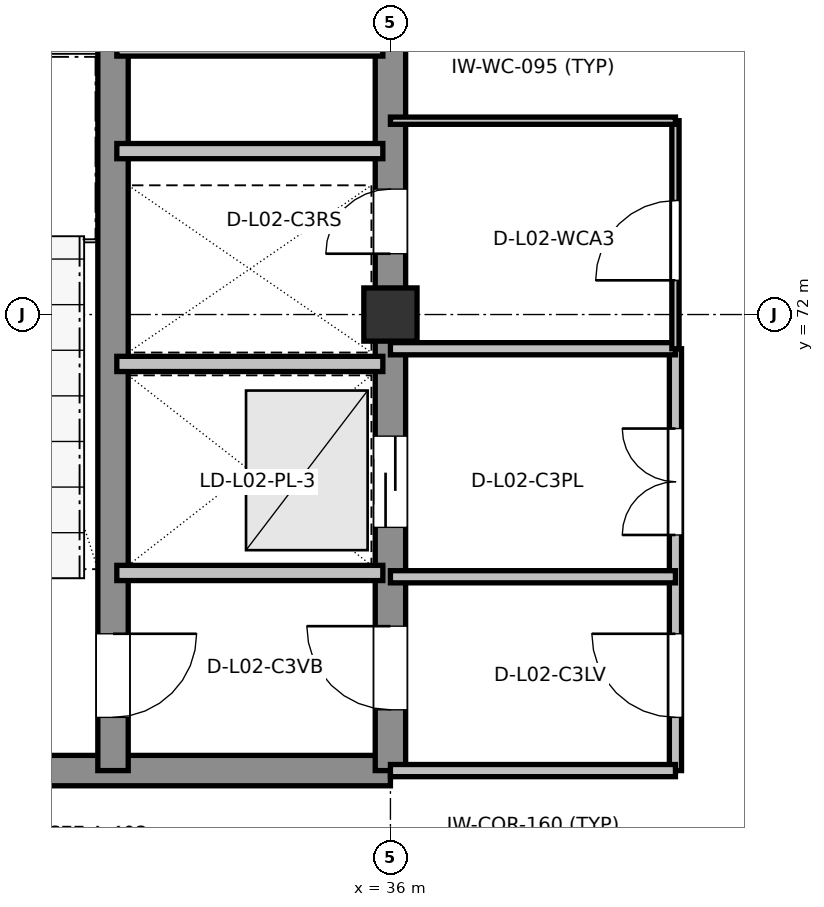
"""IFC4 building model, lengths in metres.
Left out: names, types, materials, properties, quantities, classifications, styles, units other than length and angle.
Written with IfcOpenShell. Run it as: python <this file> out.ifc"""

import sys

from ifc_helpers import new_model, si_unit, direction, frame, frame_2d, origin, origin_2d, place, context, subcontext, project, spatial, rectangle, extrude, element, fill, save


model = new_model("IFC4")
c1 = context("Model", 3, precision=1e-05, world=origin(), true_north=direction((0.0, 1.0)))
c2 = subcontext(c1, "Body", "Model", "MODEL_VIEW")
j1 = project(units=[si_unit("LENGTHUNIT", "METRE"), si_unit("PLANEANGLEUNIT", "RADIAN")], contexts=[c1])
p1 = place(None, origin())
s1 = spatial("IfcSite", under=j1, at=p1, CompositionType="ELEMENT")
p2 = place(p1, origin())
s2 = spatial("IfcBuilding", under=s1, at=p2, CompositionType="ELEMENT")
p3 = place(p2, frame((0.0, 0.0, 10.2)))
s3 = spatial("IfcBuildingStorey", under=s2, at=p3, CompositionType="ELEMENT", Elevation=10.2)
p4 = place(p3, frame((36.0, 72.0, 0.0), z_axis=(0.0, 0.0, 1.0), x_axis=(1.0, 0.0, 0.0)))
e1 = element("IfcColumn", 1, at=p4, inside=s3, PredefinedType="COLUMN", context=c2, shape_type="SweptSolid", body=[
    extrude(rectangle(XDim=0.7, YDim=0.7, at=origin_2d()), origin(), (0.0, 0.0, 1.0), 4.8),
])
p5 = place(p3, frame((27.0, 66.0, 0.0), z_axis=(0.0, 0.0, 1.0), x_axis=(1.0, 0.0, 0.0)))
e2 = element("IfcWall", 2, at=p5, inside=s3, PredefinedType="SHEAR", context=c2, shape_type="SweptSolid", body=[
    extrude(rectangle(XDim=9.0, YDim=0.4, at=frame_2d((4.5, 0.0))), origin(), (0.0, 0.0, 1.0), 4.56),
])
p6 = place(p3, frame((36.0, 66.0, 0.0), z_axis=(0.0, 0.0, 1.0), x_axis=(0.0, 1.0, 0.0)))
e3 = element("IfcWall", 3, at=p6, inside=s3, PredefinedType="SHEAR", context=c2, shape_type="SweptSolid", body=[
    extrude(rectangle(XDim=18.0, YDim=0.4, at=frame_2d((9.0, 0.0))), origin(), (0.0, 0.0, 1.0), 4.56),
])
p7 = place(p6, frame((0.8, 0.0, 0.0)))
e4 = element("IfcOpeningElement", 4, at=p7, cuts=e3, PredefinedType="OPENING", context=c2, shape_type="SweptSolid", body=[
    extrude(rectangle(XDim=1.1, YDim=2.16, at=frame_2d((0.55, 1.08))), frame((0.0, 0.21, 0.0), z_axis=(0.0, -1.0, 0.0), x_axis=(1.0, 0.0, 0.0)), (0.0, 0.0, 1.0), 0.42),
])
p8 = place(p6, frame((3.2, 0.0, 0.0)))
e5 = element("IfcOpeningElement", 5, at=p8, cuts=e3, PredefinedType="OPENING", context=c2, shape_type="SweptSolid", body=[
    extrude(rectangle(XDim=1.2, YDim=2.2, at=frame_2d((0.6, 1.1))), frame((0.0, 0.21, 0.0), z_axis=(0.0, -1.0, 0.0), x_axis=(1.0, 0.0, 0.0)), (0.0, 0.0, 1.0), 0.42),
])
p9 = place(p6, frame((6.8, 0.0, 0.0)))
e6 = element("IfcOpeningElement", 6, at=p9, cuts=e3, PredefinedType="OPENING", context=c2, shape_type="SweptSolid", body=[
    extrude(rectangle(XDim=0.85, YDim=2.1, at=frame_2d((0.425, 1.05))), frame((0.0, 0.21, 0.0), z_axis=(0.0, -1.0, 0.0), x_axis=(1.0, 0.0, 0.0)), (0.0, 0.0, 1.0), 0.42),
])
p10 = place(p3, frame((32.35, 66.0, 0.0), z_axis=(0.0, 0.0, 1.0), x_axis=(0.0, 1.0, 0.0)))
e7 = element("IfcWall", 7, at=p10, inside=s3, PredefinedType="SHEAR", context=c2, shape_type="SweptSolid", body=[
    extrude(rectangle(XDim=18.0, YDim=0.4, at=frame_2d((9.0, 0.0))), origin(), (0.0, 0.0, 1.0), 4.56),
])
p11 = place(p10, frame((0.7, 0.0, 0.0)))
e8 = element("IfcOpeningElement", 8, at=p11, cuts=e7, PredefinedType="OPENING", context=c2, shape_type="SweptSolid", body=[
    extrude(rectangle(XDim=1.1, YDim=2.16, at=frame_2d((0.55, 1.08))), frame((0.0, 0.21, 0.0), z_axis=(0.0, -1.0, 0.0), x_axis=(1.0, 0.0, 0.0)), (0.0, 0.0, 1.0), 0.42),
])
for number, where, z_axis, x_axis in (
    (9, (32.4, 68.6, 0.0), (0.0, 0.0, 1.0), (1.0, 0.0, 0.0)),
    (10, (32.4, 71.35, 0.0), (0.0, 0.0, 1.0), (1.0, 0.0, 0.0)),
    (11, (32.4, 74.15, 0.0), (0.0, 0.0, 1.0), (1.0, 0.0, 0.0)),
    (12, (32.4, 75.5, 0.0), (0.0, 0.0, 1.0), (1.0, 0.0, 0.0)),
):
    element("IfcWall", number, at=place(p3, frame(where, z_axis=z_axis, x_axis=x_axis)), inside=s3, PredefinedType="PARTITIONING", context=c2, shape_type="SweptSolid", body=[
        extrude(rectangle(XDim=3.5, YDim=0.2, at=frame_2d((1.75, 0.0))), origin(), (0.0, 0.0, 1.0), 4.56),
    ])
p12 = place(p3, frame((39.75, 66.0, 0.0), z_axis=(0.0, 0.0, 1.0), x_axis=(0.0, 1.0, 0.0)))
e13 = element("IfcWall", 13, at=p12, inside=s3, PredefinedType="PARTITIONING", context=c2, shape_type="SweptSolid", body=[
    extrude(rectangle(XDim=5.55, YDim=0.16, at=frame_2d((2.775, 0.0))), origin(), (0.0, 0.0, 1.0), 4.56),
])
p13 = place(p12, frame((0.7, 0.0, 0.0)))
e14 = element("IfcOpeningElement", 14, at=p13, cuts=e13, PredefinedType="OPENING", context=c2, shape_type="SweptSolid", body=[
    extrude(rectangle(XDim=1.1, YDim=2.16, at=frame_2d((0.55, 1.08))), frame((0.0, 0.09, 0.0), z_axis=(0.0, -1.0, 0.0), x_axis=(1.0, 0.0, 0.0)), (0.0, 0.0, 1.0), 0.18),
])
p14 = place(p12, frame((3.1, 0.0, 0.0)))
e15 = element("IfcOpeningElement", 15, at=p14, cuts=e13, PredefinedType="OPENING", context=c2, shape_type="SweptSolid", body=[
    extrude(rectangle(XDim=1.4, YDim=2.2, at=frame_2d((0.7, 1.1))), frame((0.0, 0.09, 0.0), z_axis=(0.0, -1.0, 0.0), x_axis=(1.0, 0.0, 0.0)), (0.0, 0.0, 1.0), 0.18),
])
p15 = place(p3, frame((36.0, 66.0, 0.0), z_axis=(0.0, 0.0, 1.0), x_axis=(1.0, 0.0, 0.0)))
e16 = element("IfcWall", 16, at=p15, inside=s3, PredefinedType="PARTITIONING", context=c2, shape_type="SweptSolid", body=[
    extrude(rectangle(XDim=3.75, YDim=0.16, at=frame_2d((1.875, 0.0))), origin(), (0.0, 0.0, 1.0), 4.215),
])
for number, where, z_axis, x_axis in (
    (17, (36.0, 68.55, 0.0), (0.0, 0.0, 1.0), (1.0, 0.0, 0.0)),
    (18, (36.0, 71.55, 0.0), (0.0, 0.0, 1.0), (1.0, 0.0, 0.0)),
):
    element("IfcWall", number, at=place(p3, frame(where, z_axis=z_axis, x_axis=x_axis)), inside=s3, PredefinedType="PARTITIONING", context=c2, shape_type="SweptSolid", body=[
        extrude(rectangle(XDim=3.75, YDim=0.16, at=frame_2d((1.875, 0.0))), origin(), (0.0, 0.0, 1.0), 4.56),
    ])
p16 = place(p3, frame((39.75, 71.55, 0.0), z_axis=(0.0, 0.0, 1.0), x_axis=(0.0, 1.0, 0.0)))
e19 = element("IfcWall", 19, at=p16, inside=s3, PredefinedType="PARTITIONING", context=c2, shape_type="SweptSolid", body=[
    extrude(rectangle(XDim=3.0, YDim=0.095, at=frame_2d((1.5, 0.0))), origin(), (0.0, 0.0, 1.0), 4.56),
])
p17 = place(p16, frame((0.9, 0.0, 0.0)))
e20 = element("IfcOpeningElement", 20, at=p17, cuts=e19, PredefinedType="OPENING", context=c2, shape_type="SweptSolid", body=[
    extrude(rectangle(XDim=1.05, YDim=2.13, at=frame_2d((0.525, 1.065))), frame((0.0, 0.057, 0.0), z_axis=(0.0, -1.0, 0.0), x_axis=(1.0, 0.0, 0.0)), (0.0, 0.0, 1.0), 0.115),
])
p18 = place(p3, frame((36.0, 74.55, 0.0), z_axis=(0.0, 0.0, 1.0), x_axis=(1.0, 0.0, 0.0)))
e21 = element("IfcWall", 21, at=p18, inside=s3, PredefinedType="PARTITIONING", context=c2, shape_type="SweptSolid", body=[
    extrude(rectangle(XDim=3.75, YDim=0.095, at=frame_2d((1.875, 0.0))), origin(), (0.0, 0.0, 1.0), 4.56),
])
p19 = place(p11, frame((1.1, 0.0, 0.0), z_axis=(0.0, 0.0, 1.0), x_axis=(-1.0, 0.0, 0.0)))
e22 = element("IfcDoor", 22, at=p19, inside=s3, OperationType="SINGLE_SWING_LEFT", PredefinedType="DOOR", context=c2, shape_type="SweptSolid", body=[
    extrude(rectangle(XDim=1.1, YDim=2.16, at=frame_2d((0.55, 1.08))), frame((0.0, 0.025, 0.0), z_axis=(0.0, -1.0, 0.0), x_axis=(1.0, 0.0, 0.0)), (0.0, 0.0, 1.0), 0.05),
])
fill(e8, e22)
p20 = place(p7, origin())
e23 = element("IfcDoor", 23, at=p20, inside=s3, OperationType="SINGLE_SWING_RIGHT", PredefinedType="DOOR", context=c2, shape_type="SweptSolid", body=[
    extrude(rectangle(XDim=1.1, YDim=2.16, at=frame_2d((0.55, 1.08))), frame((0.0, 0.025, 0.0), z_axis=(0.0, -1.0, 0.0), x_axis=(1.0, 0.0, 0.0)), (0.0, 0.0, 1.0), 0.05),
])
fill(e4, e23)
p21 = place(p8, origin())
e24 = element("IfcDoor", 24, at=p21, inside=s3, OperationType="SLIDING_TO_LEFT", PredefinedType="DOOR", context=c2, shape_type="SweptSolid", body=[
    extrude(rectangle(XDim=1.2, YDim=2.2, at=frame_2d((0.6, 1.1))), frame((0.0, 0.025, 0.0), z_axis=(0.0, -1.0, 0.0), x_axis=(1.0, 0.0, 0.0)), (0.0, 0.0, 1.0), 0.05),
])
fill(e5, e24)
p22 = place(p9, origin())
e25 = element("IfcDoor", 25, at=p22, inside=s3, OperationType="SINGLE_SWING_LEFT", PredefinedType="DOOR", context=c2, shape_type="SweptSolid", body=[
    extrude(rectangle(XDim=0.85, YDim=2.1, at=frame_2d((0.425, 1.05))), frame((0.0, 0.025, 0.0), z_axis=(0.0, -1.0, 0.0), x_axis=(1.0, 0.0, 0.0)), (0.0, 0.0, 1.0), 0.05),
])
fill(e6, e25)
p23 = place(p13, origin())
e26 = element("IfcDoor", 26, at=p23, inside=s3, OperationType="SINGLE_SWING_RIGHT", PredefinedType="DOOR", context=c2, shape_type="SweptSolid", body=[
    extrude(rectangle(XDim=1.1, YDim=2.16, at=frame_2d((0.55, 1.08))), frame((0.0, 0.025, 0.0), z_axis=(0.0, -1.0, 0.0), x_axis=(1.0, 0.0, 0.0)), (0.0, 0.0, 1.0), 0.05),
])
fill(e14, e26)
p24 = place(p14, origin())
e27 = element("IfcDoor", 27, at=p24, inside=s3, OperationType="DOUBLE_DOOR_SINGLE_SWING", PredefinedType="DOOR", context=c2, shape_type="SweptSolid", body=[
    extrude(rectangle(XDim=1.4, YDim=2.2, at=frame_2d((0.7, 1.1))), frame((0.0, 0.025, 0.0), z_axis=(0.0, -1.0, 0.0), x_axis=(1.0, 0.0, 0.0)), (0.0, 0.0, 1.0), 0.05),
])
fill(e15, e27)
p25 = place(p17, origin())
e28 = element("IfcDoor", 28, at=p25, inside=s3, OperationType="SINGLE_SWING_LEFT", PredefinedType="DOOR", context=c2, shape_type="SweptSolid", body=[
    extrude(rectangle(XDim=1.05, YDim=2.13, at=frame_2d((0.525, 1.065))), frame((0.0, 0.025, 0.0), z_axis=(0.0, -1.0, 0.0), x_axis=(1.0, 0.0, 0.0)), (0.0, 0.0, 1.0), 0.05),
])
fill(e20, e28)
save(model, sys.argv[1])
